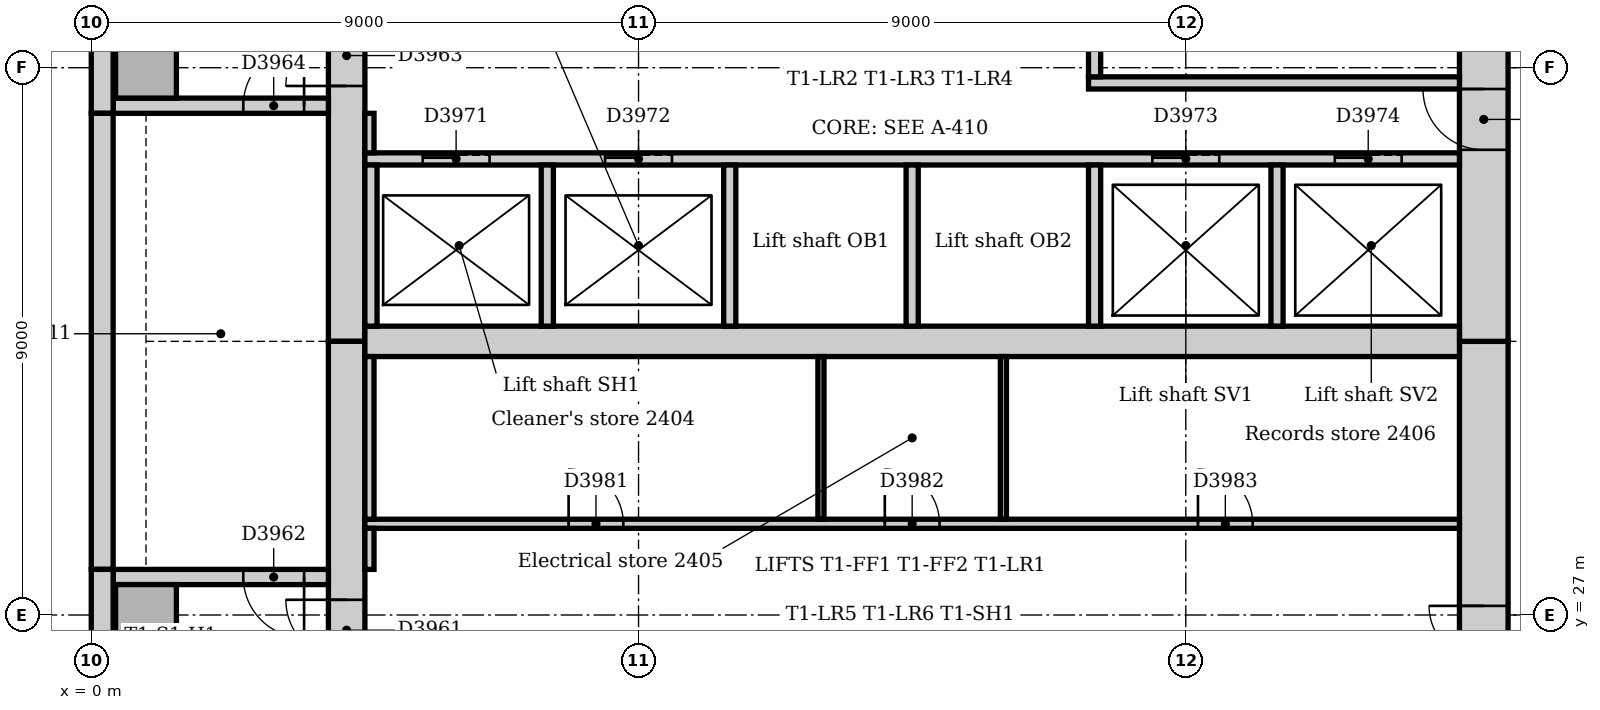
"""IFC4 building model, lengths in metres.
Left out: names, types, materials, properties, quantities, classifications, styles, units other than length and angle.
Written with IfcOpenShell. Run it as: python <this file> out.ifc"""

import sys

from ifc_helpers import new_model, si_unit, direction, frame, frame_2d, origin, origin_2d, place, context, subcontext, project, spatial, rectangle, extrude, element, fill, save


model = new_model("IFC4")
c1 = context("Model", 3, precision=1e-05, world=origin(), true_north=direction((0.0, 1.0)))
c2 = subcontext(c1, "Body", "Model", "MODEL_VIEW")
j1 = project(units=[si_unit("LENGTHUNIT", "METRE"), si_unit("PLANEANGLEUNIT", "RADIAN")], contexts=[c1])
p1 = place(None, origin())
s1 = spatial("IfcSite", under=j1, at=p1, CompositionType="ELEMENT")
p2 = place(p1, origin())
s2 = spatial("IfcBuilding", under=s1, at=p2, CompositionType="ELEMENT")
p3 = place(p2, frame((0.0, 0.0, 104.0)))
s3 = spatial("IfcBuildingStorey", under=s2, at=p3, CompositionType="ELEMENT", Elevation=104.0)
p4 = place(p3, frame((22.9, 21.0, 0.0), z_axis=(0.0, 0.0, 1.0), x_axis=(0.0, 1.0, 0.0)))
e1 = element("IfcWall", 1, at=p4, inside=s3, PredefinedType="SOLIDWALL", context=c2, shape_type="SweptSolid", body=[
    extrude(rectangle(XDim=10.5, YDim=0.8, at=frame_2d((5.25, 0.0))), origin(), (0.0, 0.0, 1.0), 4.0),
])
p5 = place(p4, frame((4.35, 0.0, 0.0)))
e2 = element("IfcOpeningElement", 2, at=p5, cuts=e1, PredefinedType="OPENING", context=c2, shape_type="SweptSolid", body=[
    extrude(rectangle(XDim=1.8, YDim=2.1, at=frame_2d((0.9, 1.05))), frame((0.0, 0.41, 0.0), z_axis=(0.0, -1.0, 0.0), x_axis=(1.0, 0.0, 0.0)), (0.0, 0.0, 1.0), 0.82),
])
p6 = place(p3, frame((22.9, 31.5, 0.0), z_axis=(0.0, 0.0, 1.0), x_axis=(0.0, 1.0, 0.0)))
e3 = element("IfcWall", 3, at=p6, inside=s3, PredefinedType="SOLIDWALL", context=c2, shape_type="SweptSolid", body=[
    extrude(rectangle(XDim=10.5, YDim=0.8, at=frame_2d((5.25, 0.0))), origin(), (0.0, 0.0, 1.0), 4.0),
])
p7 = place(p6, frame((3.15, 0.0, 0.0)))
e4 = element("IfcOpeningElement", 4, at=p7, cuts=e3, PredefinedType="OPENING", context=c2, shape_type="SweptSolid", body=[
    extrude(rectangle(XDim=1.0, YDim=2.1, at=frame_2d((0.5, 1.05))), frame((0.0, 0.41, 0.0), z_axis=(0.0, -1.0, 0.0), x_axis=(1.0, 0.0, 0.0)), (0.0, 0.0, 1.0), 0.82),
])
p8 = place(p6, frame((5.2, 0.0, 0.0)))
e5 = element("IfcOpeningElement", 5, at=p8, cuts=e3, PredefinedType="OPENING", context=c2, shape_type="SweptSolid", body=[
    extrude(rectangle(XDim=1.0, YDim=2.1, at=frame_2d((0.5, 1.05))), frame((0.0, 0.41, 0.0), z_axis=(0.0, -1.0, 0.0), x_axis=(1.0, 0.0, 0.0)), (0.0, 0.0, 1.0), 0.82),
])
p9 = place(p3, frame((4.2, 42.0, 0.0), z_axis=(0.0, 0.0, 1.0), x_axis=(0.0, -1.0, 0.0)))
e6 = element("IfcWall", 6, at=p9, inside=s3, PredefinedType="SOLIDWALL", context=c2, shape_type="SweptSolid", body=[
    extrude(rectangle(XDim=10.5, YDim=0.6, at=frame_2d((5.25, 0.0))), origin(), (0.0, 0.0, 1.0), 4.0),
])
p10 = place(p9, frame((5.3, 0.0, 0.0)))
e7 = element("IfcOpeningElement", 7, at=p10, cuts=e6, PredefinedType="OPENING", context=c2, shape_type="SweptSolid", body=[
    extrude(rectangle(XDim=1.0, YDim=2.1, at=frame_2d((0.5, 1.05))), frame((0.0, 0.31, 0.0), z_axis=(0.0, -1.0, 0.0), x_axis=(1.0, 0.0, 0.0)), (0.0, 0.0, 1.0), 0.62),
])
p11 = place(p3, frame((4.2, 31.5, 0.0), z_axis=(0.0, 0.0, 1.0), x_axis=(0.0, -1.0, 0.0)))
e8 = element("IfcWall", 8, at=p11, inside=s3, PredefinedType="SOLIDWALL", context=c2, shape_type="SweptSolid", body=[
    extrude(rectangle(XDim=10.5, YDim=0.6, at=frame_2d((5.25, 0.0))), origin(), (0.0, 0.0, 1.0), 4.0),
])
p12 = place(p11, frame((4.25, 0.0, 0.0)))
e9 = element("IfcOpeningElement", 9, at=p12, cuts=e8, PredefinedType="OPENING", context=c2, shape_type="SweptSolid", body=[
    extrude(rectangle(XDim=1.0, YDim=2.1, at=frame_2d((0.5, 1.05))), frame((0.0, 0.31, 0.0), z_axis=(0.0, -1.0, 0.0), x_axis=(1.0, 0.0, 0.0)), (0.0, 0.0, 1.0), 0.62),
])
p13 = place(p3, frame((4.5, 31.5, 0.0), z_axis=(0.0, 0.0, 1.0), x_axis=(1.0, 0.0, 0.0)))
e10 = element("IfcWall", 10, at=p13, inside=s3, PredefinedType="SOLIDWALL", context=c2, shape_type="SweptSolid", body=[
    extrude(rectangle(XDim=18.0, YDim=0.5, at=frame_2d((9.0, 0.0))), origin(), (0.0, 0.0, 1.0), 4.0),
])
p14 = place(p3, frame((3.9, 27.625, 0.0), z_axis=(0.0, 0.0, 1.0), x_axis=(-1.0, 0.0, 0.0)))
e11 = element("IfcWall", 11, at=p14, inside=s3, PredefinedType="SOLIDWALL", context=c2, shape_type="SweptSolid", body=[
    extrude(rectangle(XDim=3.54, YDim=0.25, at=frame_2d((1.77, 0.0))), origin(), (0.0, 0.0, 1.0), 4.0),
])
p15 = place(p14, frame((0.4, 0.0, 0.0)))
e12 = element("IfcOpeningElement", 12, at=p15, cuts=e11, PredefinedType="OPENING", context=c2, shape_type="SweptSolid", body=[
    extrude(rectangle(XDim=1.0, YDim=2.1, at=frame_2d((0.5, 1.05))), frame((0.0, 0.135, 0.0), z_axis=(0.0, -1.0, 0.0), x_axis=(1.0, 0.0, 0.0)), (0.0, 0.0, 1.0), 0.27),
])
p16 = place(p3, frame((0.36, 35.375, 0.0), z_axis=(0.0, 0.0, 1.0), x_axis=(1.0, 0.0, 0.0)))
e13 = element("IfcWall", 13, at=p16, inside=s3, PredefinedType="SOLIDWALL", context=c2, shape_type="SweptSolid", body=[
    extrude(rectangle(XDim=3.54, YDim=0.25, at=frame_2d((1.77, 0.0))), origin(), (0.0, 0.0, 1.0), 4.0),
])
p17 = place(p16, frame((2.14, 0.0, 0.0)))
e14 = element("IfcOpeningElement", 14, at=p17, cuts=e13, PredefinedType="OPENING", context=c2, shape_type="SweptSolid", body=[
    extrude(rectangle(XDim=1.0, YDim=2.1, at=frame_2d((0.5, 1.05))), frame((0.0, 0.135, 0.0), z_axis=(0.0, -1.0, 0.0), x_axis=(1.0, 0.0, 0.0)), (0.0, 0.0, 1.0), 0.27),
])
for number, where, z_axis, x_axis in (
    (15, (0.9, 27.0, 0.0), (0.0, 0.0, 1.0), (1.0, 0.0, 0.0)),
    (16, (0.9, 36.0, 0.0), (0.0, 0.0, 1.0), (1.0, 0.0, 0.0)),
):
    element("IfcColumn", number, at=place(p3, frame(where, z_axis=z_axis, x_axis=x_axis)), inside=s3, PredefinedType="COLUMN", context=c2, shape_type="SweptSolid", body=[
        extrude(rectangle(XDim=1.0, YDim=1.0, at=origin_2d()), origin(), (0.0, 0.0, 1.0), 4.0),
    ])
p18 = place(p3, frame((0.18, 42.0, 0.0), z_axis=(0.0, 0.0, 1.0), x_axis=(0.0, -1.0, 0.0)))
e17 = element("IfcWall", 17, at=p18, inside=s3, PredefinedType="STANDARD", context=c2, shape_type="SweptSolid", body=[
    extrude(rectangle(XDim=6.75, YDim=0.36, at=frame_2d((3.375, 0.0))), origin(), (0.0, 0.0, 1.0), 3.85),
])
p19 = place(p3, frame((0.18, 35.25, 0.0), z_axis=(0.0, 0.0, 1.0), x_axis=(0.0, -1.0, 0.0)))
e18 = element("IfcWall", 18, at=p19, inside=s3, PredefinedType="STANDARD", context=c2, shape_type="SweptSolid", body=[
    extrude(rectangle(XDim=7.5, YDim=0.36, at=frame_2d((3.75, 0.0))), origin(), (0.0, 0.0, 1.0), 3.85),
])
p20 = place(p3, frame((0.18, 27.75, 0.0), z_axis=(0.0, 0.0, 1.0), x_axis=(0.0, -1.0, 0.0)))
e19 = element("IfcWall", 19, at=p20, inside=s3, PredefinedType="STANDARD", context=c2, shape_type="SweptSolid", body=[
    extrude(rectangle(XDim=6.75, YDim=0.36, at=frame_2d((3.375, 0.0))), origin(), (0.0, 0.0, 1.0), 3.85),
])
p21 = place(p3, frame((16.4, 35.75, 0.0), z_axis=(0.0, 0.0, 1.0), x_axis=(1.0, 0.0, 0.0)))
e20 = element("IfcWall", 20, at=p21, inside=s3, PredefinedType="PARTITIONING", context=c2, shape_type="SweptSolid", body=[
    extrude(rectangle(XDim=6.1, YDim=0.2, at=frame_2d((3.05, 0.0))), origin(), (0.0, 0.0, 1.0), 3.85),
])
p22 = place(p3, frame((16.5, 35.85, 0.0), z_axis=(0.0, 0.0, 1.0), x_axis=(0.0, 1.0, 0.0)))
e21 = element("IfcWall", 21, at=p22, inside=s3, PredefinedType="PARTITIONING", context=c2, shape_type="SweptSolid", body=[
    extrude(rectangle(XDim=2.55, YDim=0.2, at=frame_2d((1.275, 0.0))), origin(), (0.0, 0.0, 1.0), 3.85),
])
p23 = place(p3, frame((4.5, 34.5, 0.0), z_axis=(0.0, 0.0, 1.0), x_axis=(1.0, 0.0, 0.0)))
e22 = element("IfcWall", 22, at=p23, inside=s3, PredefinedType="PARTITIONING", context=c2, shape_type="SweptSolid", body=[
    extrude(rectangle(XDim=18.0, YDim=0.2, at=frame_2d((9.0, 0.0))), origin(), (0.0, 0.0, 1.0), 3.85),
])
p24 = place(p23, frame((0.95, 0.0, 0.0)))
e23 = element("IfcOpeningElement", 23, at=p24, cuts=e22, PredefinedType="OPENING", context=c2, shape_type="SweptSolid", body=[
    extrude(rectangle(XDim=1.1, YDim=2.1, at=frame_2d((0.55, 1.05))), frame((0.0, 0.11, 0.0), z_axis=(0.0, -1.0, 0.0), x_axis=(1.0, 0.0, 0.0)), (0.0, 0.0, 1.0), 0.22),
])
p25 = place(p23, frame((3.95, 0.0, 0.0)))
e24 = element("IfcOpeningElement", 24, at=p25, cuts=e22, PredefinedType="OPENING", context=c2, shape_type="SweptSolid", body=[
    extrude(rectangle(XDim=1.1, YDim=2.1, at=frame_2d((0.55, 1.05))), frame((0.0, 0.11, 0.0), z_axis=(0.0, -1.0, 0.0), x_axis=(1.0, 0.0, 0.0)), (0.0, 0.0, 1.0), 0.22),
])
p26 = place(p23, frame((12.95, 0.0, 0.0)))
e25 = element("IfcOpeningElement", 25, at=p26, cuts=e22, PredefinedType="OPENING", context=c2, shape_type="SweptSolid", body=[
    extrude(rectangle(XDim=1.1, YDim=2.1, at=frame_2d((0.55, 1.05))), frame((0.0, 0.11, 0.0), z_axis=(0.0, -1.0, 0.0), x_axis=(1.0, 0.0, 0.0)), (0.0, 0.0, 1.0), 0.22),
])
p27 = place(p23, frame((15.95, 0.0, 0.0)))
e26 = element("IfcOpeningElement", 26, at=p27, cuts=e22, PredefinedType="OPENING", context=c2, shape_type="SweptSolid", body=[
    extrude(rectangle(XDim=1.1, YDim=2.1, at=frame_2d((0.55, 1.05))), frame((0.0, 0.11, 0.0), z_axis=(0.0, -1.0, 0.0), x_axis=(1.0, 0.0, 0.0)), (0.0, 0.0, 1.0), 0.22),
])
for number, where, z_axis, x_axis in (
    (27, (4.6, 31.75, 0.0), (0.0, 0.0, 1.0), (0.0, 1.0, 0.0)),
    (28, (7.5, 31.75, 0.0), (0.0, 0.0, 1.0), (0.0, 1.0, 0.0)),
    (29, (10.5, 31.75, 0.0), (0.0, 0.0, 1.0), (0.0, 1.0, 0.0)),
    (30, (13.5, 31.75, 0.0), (0.0, 0.0, 1.0), (0.0, 1.0, 0.0)),
    (31, (16.5, 31.75, 0.0), (0.0, 0.0, 1.0), (0.0, 1.0, 0.0)),
    (32, (19.5, 31.75, 0.0), (0.0, 0.0, 1.0), (0.0, 1.0, 0.0)),
):
    element("IfcWall", number, at=place(p3, frame(where, z_axis=z_axis, x_axis=x_axis)), inside=s3, PredefinedType="PARTITIONING", context=c2, shape_type="SweptSolid", body=[
        extrude(rectangle(XDim=2.65, YDim=0.2, at=frame_2d((1.325, 0.0))), origin(), (0.0, 0.0, 1.0), 3.85),
    ])
p28 = place(p3, frame((4.5, 28.5, 0.0), z_axis=(0.0, 0.0, 1.0), x_axis=(1.0, 0.0, 0.0)))
e33 = element("IfcWall", 33, at=p28, inside=s3, PredefinedType="PARTITIONING", context=c2, shape_type="SweptSolid", body=[
    extrude(rectangle(XDim=18.0, YDim=0.15, at=frame_2d((9.0, 0.0))), origin(), (0.0, 0.0, 1.0), 3.85),
])
p29 = place(p28, frame((3.35, 0.0, 0.0)))
e34 = element("IfcOpeningElement", 34, at=p29, cuts=e33, PredefinedType="OPENING", context=c2, shape_type="SweptSolid", body=[
    extrude(rectangle(XDim=0.9, YDim=2.1, at=frame_2d((0.45, 1.05))), frame((0.0, 0.085, 0.0), z_axis=(0.0, -1.0, 0.0), x_axis=(1.0, 0.0, 0.0)), (0.0, 0.0, 1.0), 0.17),
])
p30 = place(p28, frame((8.55, 0.0, 0.0)))
e35 = element("IfcOpeningElement", 35, at=p30, cuts=e33, PredefinedType="OPENING", context=c2, shape_type="SweptSolid", body=[
    extrude(rectangle(XDim=0.9, YDim=2.1, at=frame_2d((0.45, 1.05))), frame((0.0, 0.085, 0.0), z_axis=(0.0, -1.0, 0.0), x_axis=(1.0, 0.0, 0.0)), (0.0, 0.0, 1.0), 0.17),
])
p31 = place(p28, frame((13.7, 0.0, 0.0)))
e36 = element("IfcOpeningElement", 36, at=p31, cuts=e33, PredefinedType="OPENING", context=c2, shape_type="SweptSolid", body=[
    extrude(rectangle(XDim=0.9, YDim=2.1, at=frame_2d((0.45, 1.05))), frame((0.0, 0.085, 0.0), z_axis=(0.0, -1.0, 0.0), x_axis=(1.0, 0.0, 0.0)), (0.0, 0.0, 1.0), 0.17),
])
p32 = place(p3, frame((4.575, 27.75, 0.0), z_axis=(0.0, 0.0, 1.0), x_axis=(0.0, 1.0, 0.0)))
e37 = element("IfcWall", 37, at=p32, inside=s3, PredefinedType="PARTITIONING", context=c2, shape_type="SweptSolid", body=[
    extrude(rectangle(XDim=0.675, YDim=0.15, at=frame_2d((0.338, 0.0))), origin(), (0.0, 0.0, 1.0), 3.85),
])
p33 = place(p3, frame((4.575, 28.575, 0.0), z_axis=(0.0, 0.0, 1.0), x_axis=(0.0, 1.0, 0.0)))
e38 = element("IfcWall", 38, at=p33, inside=s3, PredefinedType="PARTITIONING", context=c2, shape_type="SweptSolid", body=[
    extrude(rectangle(XDim=2.675, YDim=0.15, at=frame_2d((1.337, 0.0))), origin(), (0.0, 0.0, 1.0), 3.85),
])
p34 = place(p3, frame((4.575, 34.6, 0.0), z_axis=(0.0, 0.0, 1.0), x_axis=(0.0, 1.0, 0.0)))
e39 = element("IfcWall", 39, at=p34, inside=s3, PredefinedType="PARTITIONING", context=c2, shape_type="SweptSolid", body=[
    extrude(rectangle(XDim=0.65, YDim=0.15, at=frame_2d((0.325, 0.0))), origin(), (0.0, 0.0, 1.0), 3.85),
])
for number, where, z_axis, x_axis in (
    (40, (12.0, 28.575, 0.0), (0.0, 0.0, 1.0), (0.0, 1.0, 0.0)),
    (41, (15.0, 28.575, 0.0), (0.0, 0.0, 1.0), (0.0, 1.0, 0.0)),
):
    element("IfcWall", number, at=place(p3, frame(where, z_axis=z_axis, x_axis=x_axis)), inside=s3, PredefinedType="PARTITIONING", context=c2, shape_type="SweptSolid", body=[
        extrude(rectangle(XDim=2.675, YDim=0.1, at=frame_2d((1.337, 0.0))), origin(), (0.0, 0.0, 1.0), 3.85),
    ])
p35 = place(p12, frame((1.0, 0.0, 0.0), z_axis=(0.0, 0.0, 1.0), x_axis=(-1.0, 0.0, 0.0)))
e42 = element("IfcDoor", 42, at=p35, inside=s3, OperationType="SINGLE_SWING_RIGHT", PredefinedType="DOOR", context=c2, shape_type="SweptSolid", body=[
    extrude(rectangle(XDim=1.0, YDim=2.1, at=frame_2d((0.5, 1.05))), frame((0.0, 0.025, 0.0), z_axis=(0.0, -1.0, 0.0), x_axis=(1.0, 0.0, 0.0)), (0.0, 0.0, 1.0), 0.05),
])
fill(e9, e42)
p36 = place(p15, origin())
e43 = element("IfcDoor", 43, at=p36, inside=s3, OperationType="SINGLE_SWING_LEFT", PredefinedType="DOOR", context=c2, shape_type="SweptSolid", body=[
    extrude(rectangle(XDim=1.0, YDim=2.1, at=frame_2d((0.5, 1.05))), frame((0.0, 0.025, 0.0), z_axis=(0.0, -1.0, 0.0), x_axis=(1.0, 0.0, 0.0)), (0.0, 0.0, 1.0), 0.05),
])
fill(e12, e43)
p37 = place(p10, frame((1.0, 0.0, 0.0), z_axis=(0.0, 0.0, 1.0), x_axis=(-1.0, 0.0, 0.0)))
e44 = element("IfcDoor", 44, at=p37, inside=s3, OperationType="SINGLE_SWING_LEFT", PredefinedType="DOOR", context=c2, shape_type="SweptSolid", body=[
    extrude(rectangle(XDim=1.0, YDim=2.1, at=frame_2d((0.5, 1.05))), frame((0.0, 0.025, 0.0), z_axis=(0.0, -1.0, 0.0), x_axis=(1.0, 0.0, 0.0)), (0.0, 0.0, 1.0), 0.05),
])
fill(e7, e44)
p38 = place(p17, origin())
e45 = element("IfcDoor", 45, at=p38, inside=s3, OperationType="SINGLE_SWING_RIGHT", PredefinedType="DOOR", context=c2, shape_type="SweptSolid", body=[
    extrude(rectangle(XDim=1.0, YDim=2.1, at=frame_2d((0.5, 1.05))), frame((0.0, 0.025, 0.0), z_axis=(0.0, -1.0, 0.0), x_axis=(1.0, 0.0, 0.0)), (0.0, 0.0, 1.0), 0.05),
])
fill(e14, e45)
p39 = place(p24, origin())
e46 = element("IfcDoor", 46, at=p39, inside=s3, OperationType="SLIDING_TO_LEFT", PredefinedType="DOOR", context=c2, shape_type="SweptSolid", body=[
    extrude(rectangle(XDim=1.1, YDim=2.1, at=frame_2d((0.55, 1.05))), frame((0.0, 0.025, 0.0), z_axis=(0.0, -1.0, 0.0), x_axis=(1.0, 0.0, 0.0)), (0.0, 0.0, 1.0), 0.05),
])
fill(e23, e46)
p40 = place(p25, origin())
e47 = element("IfcDoor", 47, at=p40, inside=s3, OperationType="SLIDING_TO_LEFT", PredefinedType="DOOR", context=c2, shape_type="SweptSolid", body=[
    extrude(rectangle(XDim=1.1, YDim=2.1, at=frame_2d((0.55, 1.05))), frame((0.0, 0.025, 0.0), z_axis=(0.0, -1.0, 0.0), x_axis=(1.0, 0.0, 0.0)), (0.0, 0.0, 1.0), 0.05),
])
fill(e24, e47)
p41 = place(p26, origin())
e48 = element("IfcDoor", 48, at=p41, inside=s3, OperationType="SLIDING_TO_LEFT", PredefinedType="DOOR", context=c2, shape_type="SweptSolid", body=[
    extrude(rectangle(XDim=1.1, YDim=2.1, at=frame_2d((0.55, 1.05))), frame((0.0, 0.025, 0.0), z_axis=(0.0, -1.0, 0.0), x_axis=(1.0, 0.0, 0.0)), (0.0, 0.0, 1.0), 0.05),
])
fill(e25, e48)
p42 = place(p27, origin())
e49 = element("IfcDoor", 49, at=p42, inside=s3, OperationType="SLIDING_TO_LEFT", PredefinedType="DOOR", context=c2, shape_type="SweptSolid", body=[
    extrude(rectangle(XDim=1.1, YDim=2.1, at=frame_2d((0.55, 1.05))), frame((0.0, 0.025, 0.0), z_axis=(0.0, -1.0, 0.0), x_axis=(1.0, 0.0, 0.0)), (0.0, 0.0, 1.0), 0.05),
])
fill(e26, e49)
p43 = place(p5, origin())
e50 = element("IfcDoor", 50, at=p43, inside=s3, OperationType="DOUBLE_DOOR_DOUBLE_SWING", PredefinedType="DOOR", context=c2, shape_type="SweptSolid", body=[
    extrude(rectangle(XDim=1.8, YDim=2.1, at=frame_2d((0.9, 1.05))), frame((0.0, 0.025, 0.0), z_axis=(0.0, -1.0, 0.0), x_axis=(1.0, 0.0, 0.0)), (0.0, 0.0, 1.0), 0.05),
])
fill(e2, e50)
p44 = place(p7, origin())
e51 = element("IfcDoor", 51, at=p44, inside=s3, OperationType="SINGLE_SWING_RIGHT", PredefinedType="DOOR", context=c2, shape_type="SweptSolid", body=[
    extrude(rectangle(XDim=1.0, YDim=2.1, at=frame_2d((0.5, 1.05))), frame((0.0, 0.025, 0.0), z_axis=(0.0, -1.0, 0.0), x_axis=(1.0, 0.0, 0.0)), (0.0, 0.0, 1.0), 0.05),
])
fill(e4, e51)
p45 = place(p29, origin())
e52 = element("IfcDoor", 52, at=p45, inside=s3, OperationType="SINGLE_SWING_LEFT", PredefinedType="DOOR", context=c2, shape_type="SweptSolid", body=[
    extrude(rectangle(XDim=0.9, YDim=2.1, at=frame_2d((0.45, 1.05))), frame((0.0, 0.025, 0.0), z_axis=(0.0, -1.0, 0.0), x_axis=(1.0, 0.0, 0.0)), (0.0, 0.0, 1.0), 0.05),
])
fill(e34, e52)
p46 = place(p30, origin())
e53 = element("IfcDoor", 53, at=p46, inside=s3, OperationType="SINGLE_SWING_LEFT", PredefinedType="DOOR", context=c2, shape_type="SweptSolid", body=[
    extrude(rectangle(XDim=0.9, YDim=2.1, at=frame_2d((0.45, 1.05))), frame((0.0, 0.025, 0.0), z_axis=(0.0, -1.0, 0.0), x_axis=(1.0, 0.0, 0.0)), (0.0, 0.0, 1.0), 0.05),
])
fill(e35, e53)
p47 = place(p31, origin())
e54 = element("IfcDoor", 54, at=p47, inside=s3, OperationType="SINGLE_SWING_LEFT", PredefinedType="DOOR", context=c2, shape_type="SweptSolid", body=[
    extrude(rectangle(XDim=0.9, YDim=2.1, at=frame_2d((0.45, 1.05))), frame((0.0, 0.025, 0.0), z_axis=(0.0, -1.0, 0.0), x_axis=(1.0, 0.0, 0.0)), (0.0, 0.0, 1.0), 0.05),
])
fill(e36, e54)
save(model, sys.argv[1])
